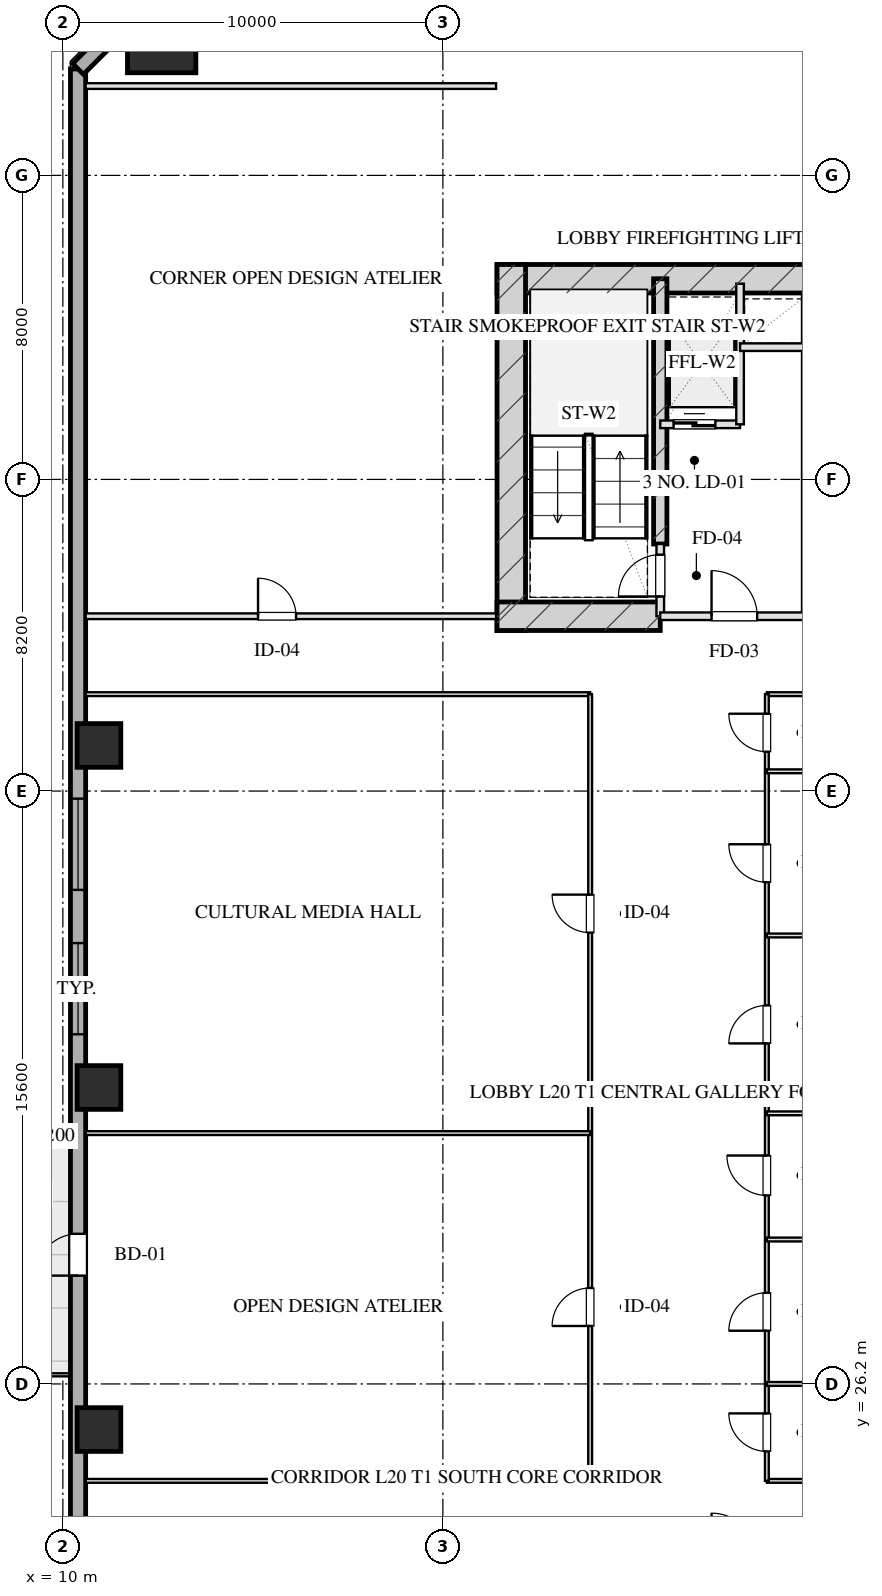
"""IFC4 building model, lengths in metres.
Left out: names, types, materials, properties, quantities, classifications, styles, units other than length and angle.
Written with IfcOpenShell. Run it as: python <this file> out.ifc"""

import sys

from ifc_helpers import new_model, si_unit, direction, frame, frame_2d, origin, origin_2d, place, context, subcontext, project, spatial, rectangle, hollow_rectangle, extrude, element, fill, save


model = new_model("IFC4")
c1 = context("Model", 3, precision=1e-05, world=origin(), true_north=direction((0.0, 1.0)))
c2 = subcontext(c1, "Body", "Model", "MODEL_VIEW")
j1 = project(units=[si_unit("LENGTHUNIT", "METRE"), si_unit("PLANEANGLEUNIT", "RADIAN")], contexts=[c1])
p1 = place(None, origin())
s1 = spatial("IfcSite", under=j1, at=p1, CompositionType="ELEMENT")
p2 = place(p1, origin())
s2 = spatial("IfcBuilding", under=s1, at=p2, CompositionType="ELEMENT")
p3 = place(p2, frame((0.0, 0.0, 81.65)))
s3 = spatial("IfcBuildingStorey", under=s2, at=p3, CompositionType="ELEMENT", Elevation=81.65)
p4 = place(p3, frame((21.425, 55.28, 0.0), z_axis=(0.0, 0.0, 1.0), x_axis=(1.0, 0.0, 0.0)))
e1 = element("IfcWall", 1, at=p4, inside=s3, PredefinedType="SHEAR", context=c2, shape_type="SweptSolid", body=[
    extrude(rectangle(XDim=17.15, YDim=0.75, at=frame_2d((8.575, 0.0))), origin(), (0.0, 0.0, 1.0), 3.45),
])
p5 = place(p3, frame((21.8, 46.025, 0.0), z_axis=(0.0, 0.0, 1.0), x_axis=(0.0, 1.0, 0.0)))
e2 = element("IfcWall", 2, at=p5, inside=s3, PredefinedType="SHEAR", context=c2, shape_type="SweptSolid", body=[
    extrude(rectangle(XDim=9.63, YDim=0.75, at=frame_2d((4.815, 0.0))), origin(), (0.0, 0.0, 1.0), 3.45),
])
p6 = place(p3, frame((25.72, 48.3, 0.0), z_axis=(0.0, 0.0, 1.0), x_axis=(0.0, 1.0, 0.0)))
e3 = element("IfcWall", 3, at=p6, inside=s3, PredefinedType="SHEAR", context=c2, shape_type="SweptSolid", body=[
    extrude(rectangle(XDim=6.98, YDim=0.35, at=frame_2d((3.49, 0.0))), origin(), (0.0, 0.0, 1.0), 3.45),
])
p7 = place(p3, frame((21.425, 46.4, 0.0), z_axis=(0.0, 0.0, 1.0), x_axis=(1.0, 0.0, 0.0)))
e4 = element("IfcWall", 4, at=p7, inside=s3, PredefinedType="SHEAR", context=c2, shape_type="SweptSolid", body=[
    extrude(rectangle(XDim=4.295, YDim=0.75, at=frame_2d((2.147, 0.0))), origin(), (0.0, 0.0, 1.0), 3.45),
])
p8 = place(p3, frame((12.6, 61.6, 0.0), z_axis=(0.0, 0.0, 1.0), x_axis=(1.0, 0.0, 0.0)))
e5 = element("IfcColumn", 5, at=p8, inside=s3, PredefinedType="COLUMN", context=c2, shape_type="SweptSolid", body=[
    extrude(hollow_rectangle(XDim=1.8, YDim=1.8, WallThickness=0.06, at=origin_2d()), origin(), (0.0, 0.0, 1.0), 3.451),
])
for number, where, z_axis, x_axis in (
    (6, (10.95, 25.0, 0.0), (0.0, 0.0, 1.0), (1.0, 0.0, 0.0)),
    (7, (10.95, 34.0, 0.0), (0.0, 0.0, 1.0), (1.0, 0.0, 0.0)),
    (8, (10.95, 43.0, 0.0), (0.0, 0.0, 1.0), (1.0, 0.0, 0.0)),
):
    element("IfcColumn", number, at=place(p3, frame(where, z_axis=z_axis, x_axis=x_axis)), inside=s3, PredefinedType="COLUMN", context=c2, shape_type="SweptSolid", body=[
        extrude(hollow_rectangle(XDim=1.15, YDim=1.15, WallThickness=0.04, at=origin_2d()), origin(), (0.0, 0.0, 1.0), 3.451),
    ])
p9 = place(p3, frame((10.4, 7.2, 0.0), z_axis=(0.0, 0.0, 1.0), x_axis=(0.0, 1.0, 0.0)))
e9 = element("IfcWall", 9, at=p9, inside=s3, PredefinedType="SOLIDWALL", context=c2, shape_type="SweptSolid", body=[
    extrude(rectangle(XDim=53.6, YDim=0.4, at=frame_2d((26.8, 0.0))), origin(), (0.0, 0.0, 1.0), 2.61),
])
p10 = place(p9, frame((28.2, 0.0, 0.75)))
e10 = element("IfcOpeningElement", 10, at=p10, cuts=e9, PredefinedType="OPENING", context=c2, shape_type="SweptSolid", body=[
    extrude(rectangle(XDim=2.4, YDim=1.46, at=frame_2d((1.2, 0.73))), frame((0.0, 0.21, 0.0), z_axis=(0.0, -1.0, 0.0), x_axis=(1.0, 0.0, 0.0)), (0.0, 0.0, 1.0), 0.42),
])
p11 = place(p9, frame((32.0, 0.0, 0.75)))
e11 = element("IfcOpeningElement", 11, at=p11, cuts=e9, PredefinedType="OPENING", context=c2, shape_type="SweptSolid", body=[
    extrude(rectangle(XDim=2.4, YDim=1.46, at=frame_2d((1.2, 0.73))), frame((0.0, 0.21, 0.0), z_axis=(0.0, -1.0, 0.0), x_axis=(1.0, 0.0, 0.0)), (0.0, 0.0, 1.0), 0.42),
])
p12 = place(p9, frame((21.85, 0.0, 0.0)))
e12 = element("IfcOpeningElement", 12, at=p12, cuts=e9, PredefinedType="OPENING", context=c2, shape_type="SweptSolid", body=[
    extrude(rectangle(XDim=1.1, YDim=2.15, at=frame_2d((0.55, 1.075))), frame((0.0, 0.21, 0.0), z_axis=(0.0, -1.0, 0.0), x_axis=(1.0, 0.0, 0.0)), (0.0, 0.0, 1.0), 0.42),
])
p13 = place(p3, frame((10.4, 60.8, 0.0), z_axis=(0.0, 0.0, 1.0), x_axis=(0.707106781187, 0.707106781187, 0.0)))
e13 = element("IfcWall", 13, at=p13, inside=s3, PredefinedType="SOLIDWALL", context=c2, shape_type="SweptSolid", body=[
    extrude(rectangle(XDim=4.243, YDim=0.4, at=frame_2d((2.121, 0.0))), origin(), (0.0, 0.0, 1.0), 2.61),
])
p14 = place(p3, frame((25.72, 46.4, 0.0), z_axis=(0.0, 0.0, 1.0), x_axis=(0.0, 1.0, 0.0)))
e14 = element("IfcWall", 14, at=p14, inside=s3, PredefinedType="PARTITIONING", context=c2, shape_type="SweptSolid", body=[
    extrude(rectangle(XDim=1.9, YDim=0.2, at=frame_2d((0.95, 0.0))), origin(), (0.0, 0.0, 1.0), 3.175),
])
p15 = place(p14, frame((0.52, 0.0, 0.0)))
e15 = element("IfcOpeningElement", 15, at=p15, cuts=e14, PredefinedType="OPENING", context=c2, shape_type="SweptSolid", body=[
    extrude(rectangle(XDim=1.1, YDim=2.05, at=frame_2d((0.55, 1.025))), frame((0.0, 0.11, 0.0), z_axis=(0.0, -1.0, 0.0), x_axis=(1.0, 0.0, 0.0)), (0.0, 0.0, 1.0), 0.22),
])
p16 = place(p3, frame((25.72, 46.4, 0.0), z_axis=(0.0, 0.0, 1.0), x_axis=(1.0, 0.0, 0.0)))
e16 = element("IfcWall", 16, at=p16, inside=s3, PredefinedType="PARTITIONING", context=c2, shape_type="SweptSolid", body=[
    extrude(rectangle(XDim=3.83, YDim=0.2, at=frame_2d((1.915, 0.0))), origin(), (0.0, 0.0, 1.0), 3.175),
])
p17 = place(p16, frame((1.35, 0.0, 0.0)))
e17 = element("IfcOpeningElement", 17, at=p17, cuts=e16, PredefinedType="OPENING", context=c2, shape_type="SweptSolid", body=[
    extrude(rectangle(XDim=1.2, YDim=2.05, at=frame_2d((0.6, 1.025))), frame((0.0, 0.11, 0.0), z_axis=(0.0, -1.0, 0.0), x_axis=(1.0, 0.0, 0.0)), (0.0, 0.0, 1.0), 0.22),
])
p18 = place(p3, frame((25.72, 51.45, 0.0), z_axis=(0.0, 0.0, 1.0), x_axis=(1.0, 0.0, 0.0)))
e18 = element("IfcWall", 18, at=p18, inside=s3, PredefinedType="PARTITIONING", context=c2, shape_type="SweptSolid", body=[
    extrude(rectangle(XDim=2.1, YDim=0.2, at=frame_2d((1.05, 0.0))), origin(), (0.0, 0.0, 1.0), 3.175),
])
p19 = place(p18, frame((0.35, 0.0, 0.0)))
e19 = element("IfcOpeningElement", 19, at=p19, cuts=e18, PredefinedType="OPENING", context=c2, shape_type="SweptSolid", body=[
    extrude(rectangle(XDim=1.1, YDim=2.05, at=frame_2d((0.55, 1.025))), frame((0.0, 0.11, 0.0), z_axis=(0.0, -1.0, 0.0), x_axis=(1.0, 0.0, 0.0)), (0.0, 0.0, 1.0), 0.22),
])
p20 = place(p3, frame((27.82, 51.45, 0.0), z_axis=(0.0, 0.0, 1.0), x_axis=(0.0, 1.0, 0.0)))
e20 = element("IfcWall", 20, at=p20, inside=s3, PredefinedType="PARTITIONING", context=c2, shape_type="SweptSolid", body=[
    extrude(rectangle(XDim=3.7, YDim=0.2, at=frame_2d((1.85, 0.0))), origin(), (0.0, 0.0, 1.0), 3.175),
])
p21 = place(p3, frame((27.82, 53.48, 0.0), z_axis=(0.0, 0.0, 1.0), x_axis=(1.0, 0.0, 0.0)))
e21 = element("IfcWall", 21, at=p21, inside=s3, PredefinedType="PARTITIONING", context=c2, shape_type="SweptSolid", body=[
    extrude(rectangle(XDim=1.73, YDim=0.2, at=frame_2d((0.865, 0.0))), origin(), (0.0, 0.0, 1.0), 3.175),
])
p22 = place(p3, frame((10.6, 60.35, 0.0), z_axis=(0.0, 0.0, 1.0), x_axis=(1.0, 0.0, 0.0)))
e22 = element("IfcWall", 22, at=p22, inside=s3, PredefinedType="PARTITIONING", context=c2, shape_type="SweptSolid", body=[
    extrude(rectangle(XDim=10.8, YDim=0.15, at=frame_2d((5.4, 0.0))), origin(), (0.0, 0.0, 1.0), 3.175),
])
p23 = place(p3, frame((10.6, 46.4, 0.0), z_axis=(0.0, 0.0, 1.0), x_axis=(1.0, 0.0, 0.0)))
e23 = element("IfcWall", 23, at=p23, inside=s3, PredefinedType="PARTITIONING", context=c2, shape_type="SweptSolid", body=[
    extrude(rectangle(XDim=10.8, YDim=0.15, at=frame_2d((5.4, 0.0))), origin(), (0.0, 0.0, 1.0), 3.175),
])
p24 = place(p23, frame((4.536, 0.0, 0.0)))
e24 = element("IfcOpeningElement", 24, at=p24, cuts=e23, PredefinedType="OPENING", context=c2, shape_type="SweptSolid", body=[
    extrude(rectangle(XDim=1.0, YDim=2.05, at=frame_2d((0.5, 1.025))), frame((0.0, 0.085, 0.0), z_axis=(0.0, -1.0, 0.0), x_axis=(1.0, 0.0, 0.0)), (0.0, 0.0, 1.0), 0.17),
])
p25 = place(p3, frame((10.6, 23.65, 0.0), z_axis=(0.0, 0.0, 1.0), x_axis=(1.0, 0.0, 0.0)))
e25 = element("IfcWall", 25, at=p25, inside=s3, PredefinedType="MOVABLE", context=c2, shape_type="SweptSolid", body=[
    extrude(rectangle(XDim=13.275, YDim=0.1, at=frame_2d((6.637, 0.0))), origin(), (0.0, 0.0, 1.0), 3.175),
])
p26 = place(p3, frame((28.525, 23.65, 0.0), z_axis=(0.0, 0.0, 1.0), x_axis=(1.0, 0.0, 0.0)))
e26 = element("IfcWall", 26, at=p26, inside=s3, PredefinedType="MOVABLE", context=c2, shape_type="SweptSolid", body=[
    extrude(rectangle(XDim=20.875, YDim=0.1, at=frame_2d((10.438, 0.0))), origin(), (0.0, 0.0, 1.0), 3.175),
])
p27 = place(p3, frame((10.6, 44.35, 0.0), z_axis=(0.0, 0.0, 1.0), x_axis=(1.0, 0.0, 0.0)))
e27 = element("IfcWall", 27, at=p27, inside=s3, PredefinedType="MOVABLE", context=c2, shape_type="SweptSolid", body=[
    extrude(rectangle(XDim=13.275, YDim=0.1, at=frame_2d((6.637, 0.0))), origin(), (0.0, 0.0, 1.0), 3.175),
])
p28 = place(p3, frame((28.525, 44.35, 0.0), z_axis=(0.0, 0.0, 1.0), x_axis=(1.0, 0.0, 0.0)))
e28 = element("IfcWall", 28, at=p28, inside=s3, PredefinedType="MOVABLE", context=c2, shape_type="SweptSolid", body=[
    extrude(rectangle(XDim=20.875, YDim=0.1, at=frame_2d((10.438, 0.0))), origin(), (0.0, 0.0, 1.0), 3.175),
])
p29 = place(p3, frame((23.875, 23.65, 0.0), z_axis=(0.0, 0.0, 1.0), x_axis=(0.0, 1.0, 0.0)))
e29 = element("IfcWall", 29, at=p29, inside=s3, PredefinedType="MOVABLE", context=c2, shape_type="SweptSolid", body=[
    extrude(rectangle(XDim=20.7, YDim=0.1, at=frame_2d((10.35, 0.0))), origin(), (0.0, 0.0, 1.0), 3.175),
])
p30 = place(p29, frame((4.075, 0.0, 0.0)))
e30 = element("IfcOpeningElement", 30, at=p30, cuts=e29, PredefinedType="OPENING", context=c2, shape_type="SweptSolid", body=[
    extrude(rectangle(XDim=1.0, YDim=2.05, at=frame_2d((0.5, 1.025))), frame((0.0, 0.06, 0.0), z_axis=(0.0, -1.0, 0.0), x_axis=(1.0, 0.0, 0.0)), (0.0, 0.0, 1.0), 0.12),
])
p31 = place(p29, frame((14.425, 0.0, 0.0)))
e31 = element("IfcOpeningElement", 31, at=p31, cuts=e29, PredefinedType="OPENING", context=c2, shape_type="SweptSolid", body=[
    extrude(rectangle(XDim=1.0, YDim=2.05, at=frame_2d((0.5, 1.025))), frame((0.0, 0.06, 0.0), z_axis=(0.0, -1.0, 0.0), x_axis=(1.0, 0.0, 0.0)), (0.0, 0.0, 1.0), 0.12),
])
p32 = place(p3, frame((28.525, 23.65, 0.0), z_axis=(0.0, 0.0, 1.0), x_axis=(0.0, 1.0, 0.0)))
e32 = element("IfcWall", 32, at=p32, inside=s3, PredefinedType="MOVABLE", context=c2, shape_type="SweptSolid", body=[
    extrude(rectangle(XDim=20.7, YDim=0.1, at=frame_2d((10.35, 0.0))), origin(), (0.0, 0.0, 1.0), 3.175),
])
p33 = place(p32, frame((0.775, 0.0, 0.0)))
e33 = element("IfcOpeningElement", 33, at=p33, cuts=e32, PredefinedType="OPENING", context=c2, shape_type="SweptSolid", body=[
    extrude(rectangle(XDim=1.0, YDim=2.05, at=frame_2d((0.5, 1.025))), frame((0.0, 0.06, 0.0), z_axis=(0.0, -1.0, 0.0), x_axis=(1.0, 0.0, 0.0)), (0.0, 0.0, 1.0), 0.12),
])
p34 = place(p32, frame((3.95, 0.0, 0.0)))
e34 = element("IfcOpeningElement", 34, at=p34, cuts=e32, PredefinedType="OPENING", context=c2, shape_type="SweptSolid", body=[
    extrude(rectangle(XDim=1.0, YDim=2.05, at=frame_2d((0.5, 1.025))), frame((0.0, 0.06, 0.0), z_axis=(0.0, -1.0, 0.0), x_axis=(1.0, 0.0, 0.0)), (0.0, 0.0, 1.0), 0.12),
])
p35 = place(p32, frame((7.51, 0.0, 0.0)))
e35 = element("IfcOpeningElement", 35, at=p35, cuts=e32, PredefinedType="OPENING", context=c2, shape_type="SweptSolid", body=[
    extrude(rectangle(XDim=1.05, YDim=2.05, at=frame_2d((0.525, 1.025))), frame((0.0, 0.06, 0.0), z_axis=(0.0, -1.0, 0.0), x_axis=(1.0, 0.0, 0.0)), (0.0, 0.0, 1.0), 0.12),
])
p36 = place(p32, frame((11.51, 0.0, 0.0)))
e36 = element("IfcOpeningElement", 36, at=p36, cuts=e32, PredefinedType="OPENING", context=c2, shape_type="SweptSolid", body=[
    extrude(rectangle(XDim=1.0, YDim=2.05, at=frame_2d((0.5, 1.025))), frame((0.0, 0.06, 0.0), z_axis=(0.0, -1.0, 0.0), x_axis=(1.0, 0.0, 0.0)), (0.0, 0.0, 1.0), 0.12),
])
p37 = place(p32, frame((15.75, 0.0, 0.0)))
e37 = element("IfcOpeningElement", 37, at=p37, cuts=e32, PredefinedType="OPENING", context=c2, shape_type="SweptSolid", body=[
    extrude(rectangle(XDim=1.0, YDim=2.05, at=frame_2d((0.5, 1.025))), frame((0.0, 0.06, 0.0), z_axis=(0.0, -1.0, 0.0), x_axis=(1.0, 0.0, 0.0)), (0.0, 0.0, 1.0), 0.12),
])
p38 = place(p32, frame((19.185, 0.0, 0.0)))
e38 = element("IfcOpeningElement", 38, at=p38, cuts=e32, PredefinedType="OPENING", context=c2, shape_type="SweptSolid", body=[
    extrude(rectangle(XDim=1.0, YDim=2.05, at=frame_2d((0.5, 1.025))), frame((0.0, 0.06, 0.0), z_axis=(0.0, -1.0, 0.0), x_axis=(1.0, 0.0, 0.0)), (0.0, 0.0, 1.0), 0.12),
])
p39 = place(p3, frame((10.6, 32.8, 0.0), z_axis=(0.0, 0.0, 1.0), x_axis=(1.0, 0.0, 0.0)))
e39 = element("IfcWall", 39, at=p39, inside=s3, PredefinedType="MOVABLE", context=c2, shape_type="SweptSolid", body=[
    extrude(rectangle(XDim=13.275, YDim=0.1, at=frame_2d((6.637, 0.0))), origin(), (0.0, 0.0, 1.0), 3.175),
])
for number, where, z_axis, x_axis in (
    (40, (28.525, 26.2, 0.0), (0.0, 0.0, 1.0), (1.0, 0.0, 0.0)),
    (41, (28.525, 30.0, 0.0), (0.0, 0.0, 1.0), (1.0, 0.0, 0.0)),
    (42, (28.525, 33.32, 0.0), (0.0, 0.0, 1.0), (1.0, 0.0, 0.0)),
    (43, (28.525, 38.0, 0.0), (0.0, 0.0, 1.0), (1.0, 0.0, 0.0)),
    (44, (28.525, 42.32, 0.0), (0.0, 0.0, 1.0), (1.0, 0.0, 0.0)),
):
    element("IfcWall", number, at=place(p3, frame(where, z_axis=z_axis, x_axis=x_axis)), inside=s3, PredefinedType="MOVABLE", context=c2, shape_type="SweptSolid", body=[
        extrude(rectangle(XDim=20.875, YDim=0.1, at=frame_2d((10.438, 0.0))), origin(), (0.0, 0.0, 1.0), 3.175),
    ])
p40 = place(p10, origin())
e45 = element("IfcWindow", 45, at=p40, inside=s3, PartitioningType="TRIPLE_PANEL_VERTICAL", PredefinedType="WINDOW", context=c2, shape_type="SweptSolid", body=[
    extrude(rectangle(XDim=2.4, YDim=1.46, at=frame_2d((1.2, 0.73))), frame((0.0, 0.03, 0.0), z_axis=(0.0, -1.0, 0.0), x_axis=(1.0, 0.0, 0.0)), (0.0, 0.0, 1.0), 0.06),
])
fill(e10, e45)
p41 = place(p11, origin())
e46 = element("IfcWindow", 46, at=p41, inside=s3, PartitioningType="TRIPLE_PANEL_VERTICAL", PredefinedType="WINDOW", context=c2, shape_type="SweptSolid", body=[
    extrude(rectangle(XDim=2.4, YDim=1.46, at=frame_2d((1.2, 0.73))), frame((0.0, 0.03, 0.0), z_axis=(0.0, -1.0, 0.0), x_axis=(1.0, 0.0, 0.0)), (0.0, 0.0, 1.0), 0.06),
])
fill(e11, e46)
p42 = place(p12, origin())
e47 = element("IfcDoor", 47, at=p42, inside=s3, OperationType="SINGLE_SWING_LEFT", PredefinedType="DOOR", context=c2, shape_type="SweptSolid", body=[
    extrude(rectangle(XDim=1.1, YDim=2.15, at=frame_2d((0.55, 1.075))), frame((0.0, 0.025, 0.0), z_axis=(0.0, -1.0, 0.0), x_axis=(1.0, 0.0, 0.0)), (0.0, 0.0, 1.0), 0.05),
])
fill(e12, e47)
p43 = place(p15, origin())
e48 = element("IfcDoor", 48, at=p43, inside=s3, OperationType="SINGLE_SWING_LEFT", PredefinedType="DOOR", context=c2, shape_type="SweptSolid", body=[
    extrude(rectangle(XDim=1.1, YDim=2.05, at=frame_2d((0.55, 1.025))), frame((0.0, 0.025, 0.0), z_axis=(0.0, -1.0, 0.0), x_axis=(1.0, 0.0, 0.0)), (0.0, 0.0, 1.0), 0.05),
])
fill(e15, e48)
p44 = place(p17, origin())
e49 = element("IfcDoor", 49, at=p44, inside=s3, OperationType="SINGLE_SWING_LEFT", PredefinedType="DOOR", context=c2, shape_type="SweptSolid", body=[
    extrude(rectangle(XDim=1.2, YDim=2.05, at=frame_2d((0.6, 1.025))), frame((0.0, 0.025, 0.0), z_axis=(0.0, -1.0, 0.0), x_axis=(1.0, 0.0, 0.0)), (0.0, 0.0, 1.0), 0.05),
])
fill(e17, e49)
p45 = place(p19, origin())
e50 = element("IfcDoor", 50, at=p45, inside=s3, OperationType="DOUBLE_DOOR_SLIDING", PredefinedType="DOOR", context=c2, shape_type="SweptSolid", body=[
    extrude(rectangle(XDim=1.1, YDim=2.05, at=frame_2d((0.55, 1.025))), frame((0.0, 0.025, 0.0), z_axis=(0.0, -1.0, 0.0), x_axis=(1.0, 0.0, 0.0)), (0.0, 0.0, 1.0), 0.05),
])
fill(e19, e50)
p46 = place(p24, origin())
e51 = element("IfcDoor", 51, at=p46, inside=s3, OperationType="SINGLE_SWING_LEFT", PredefinedType="DOOR", context=c2, shape_type="SweptSolid", body=[
    extrude(rectangle(XDim=1.0, YDim=2.05, at=frame_2d((0.5, 1.025))), frame((0.0, 0.025, 0.0), z_axis=(0.0, -1.0, 0.0), x_axis=(1.0, 0.0, 0.0)), (0.0, 0.0, 1.0), 0.05),
])
fill(e24, e51)
p47 = place(p30, origin())
e52 = element("IfcDoor", 52, at=p47, inside=s3, OperationType="SINGLE_SWING_LEFT", PredefinedType="DOOR", context=c2, shape_type="SweptSolid", body=[
    extrude(rectangle(XDim=1.0, YDim=2.05, at=frame_2d((0.5, 1.025))), frame((0.0, 0.025, 0.0), z_axis=(0.0, -1.0, 0.0), x_axis=(1.0, 0.0, 0.0)), (0.0, 0.0, 1.0), 0.05),
])
fill(e30, e52)
p48 = place(p31, origin())
e53 = element("IfcDoor", 53, at=p48, inside=s3, OperationType="SINGLE_SWING_RIGHT", PredefinedType="DOOR", context=c2, shape_type="SweptSolid", body=[
    extrude(rectangle(XDim=1.0, YDim=2.05, at=frame_2d((0.5, 1.025))), frame((0.0, 0.025, 0.0), z_axis=(0.0, -1.0, 0.0), x_axis=(1.0, 0.0, 0.0)), (0.0, 0.0, 1.0), 0.05),
])
fill(e31, e53)
p49 = place(p33, origin())
e54 = element("IfcDoor", 54, at=p49, inside=s3, OperationType="SINGLE_SWING_RIGHT", PredefinedType="DOOR", context=c2, shape_type="SweptSolid", body=[
    extrude(rectangle(XDim=1.0, YDim=2.05, at=frame_2d((0.5, 1.025))), frame((0.0, 0.025, 0.0), z_axis=(0.0, -1.0, 0.0), x_axis=(1.0, 0.0, 0.0)), (0.0, 0.0, 1.0), 0.05),
])
fill(e33, e54)
p50 = place(p34, origin())
e55 = element("IfcDoor", 55, at=p50, inside=s3, OperationType="SINGLE_SWING_LEFT", PredefinedType="DOOR", context=c2, shape_type="SweptSolid", body=[
    extrude(rectangle(XDim=1.0, YDim=2.05, at=frame_2d((0.5, 1.025))), frame((0.0, 0.025, 0.0), z_axis=(0.0, -1.0, 0.0), x_axis=(1.0, 0.0, 0.0)), (0.0, 0.0, 1.0), 0.05),
])
fill(e34, e55)
p51 = place(p35, origin())
e56 = element("IfcDoor", 56, at=p51, inside=s3, OperationType="SINGLE_SWING_RIGHT", PredefinedType="DOOR", context=c2, shape_type="SweptSolid", body=[
    extrude(rectangle(XDim=1.05, YDim=2.05, at=frame_2d((0.525, 1.025))), frame((0.0, 0.025, 0.0), z_axis=(0.0, -1.0, 0.0), x_axis=(1.0, 0.0, 0.0)), (0.0, 0.0, 1.0), 0.05),
])
fill(e35, e56)
p52 = place(p36, origin())
e57 = element("IfcDoor", 57, at=p52, inside=s3, OperationType="SINGLE_SWING_LEFT", PredefinedType="DOOR", context=c2, shape_type="SweptSolid", body=[
    extrude(rectangle(XDim=1.0, YDim=2.05, at=frame_2d((0.5, 1.025))), frame((0.0, 0.025, 0.0), z_axis=(0.0, -1.0, 0.0), x_axis=(1.0, 0.0, 0.0)), (0.0, 0.0, 1.0), 0.05),
])
fill(e36, e57)
p53 = place(p37, origin())
e58 = element("IfcDoor", 58, at=p53, inside=s3, OperationType="SINGLE_SWING_RIGHT", PredefinedType="DOOR", context=c2, shape_type="SweptSolid", body=[
    extrude(rectangle(XDim=1.0, YDim=2.05, at=frame_2d((0.5, 1.025))), frame((0.0, 0.025, 0.0), z_axis=(0.0, -1.0, 0.0), x_axis=(1.0, 0.0, 0.0)), (0.0, 0.0, 1.0), 0.05),
])
fill(e37, e58)
p54 = place(p38, origin())
e59 = element("IfcDoor", 59, at=p54, inside=s3, OperationType="SINGLE_SWING_RIGHT", PredefinedType="DOOR", context=c2, shape_type="SweptSolid", body=[
    extrude(rectangle(XDim=1.0, YDim=2.05, at=frame_2d((0.5, 1.025))), frame((0.0, 0.025, 0.0), z_axis=(0.0, -1.0, 0.0), x_axis=(1.0, 0.0, 0.0)), (0.0, 0.0, 1.0), 0.05),
])
fill(e38, e59)
save(model, sys.argv[1])
